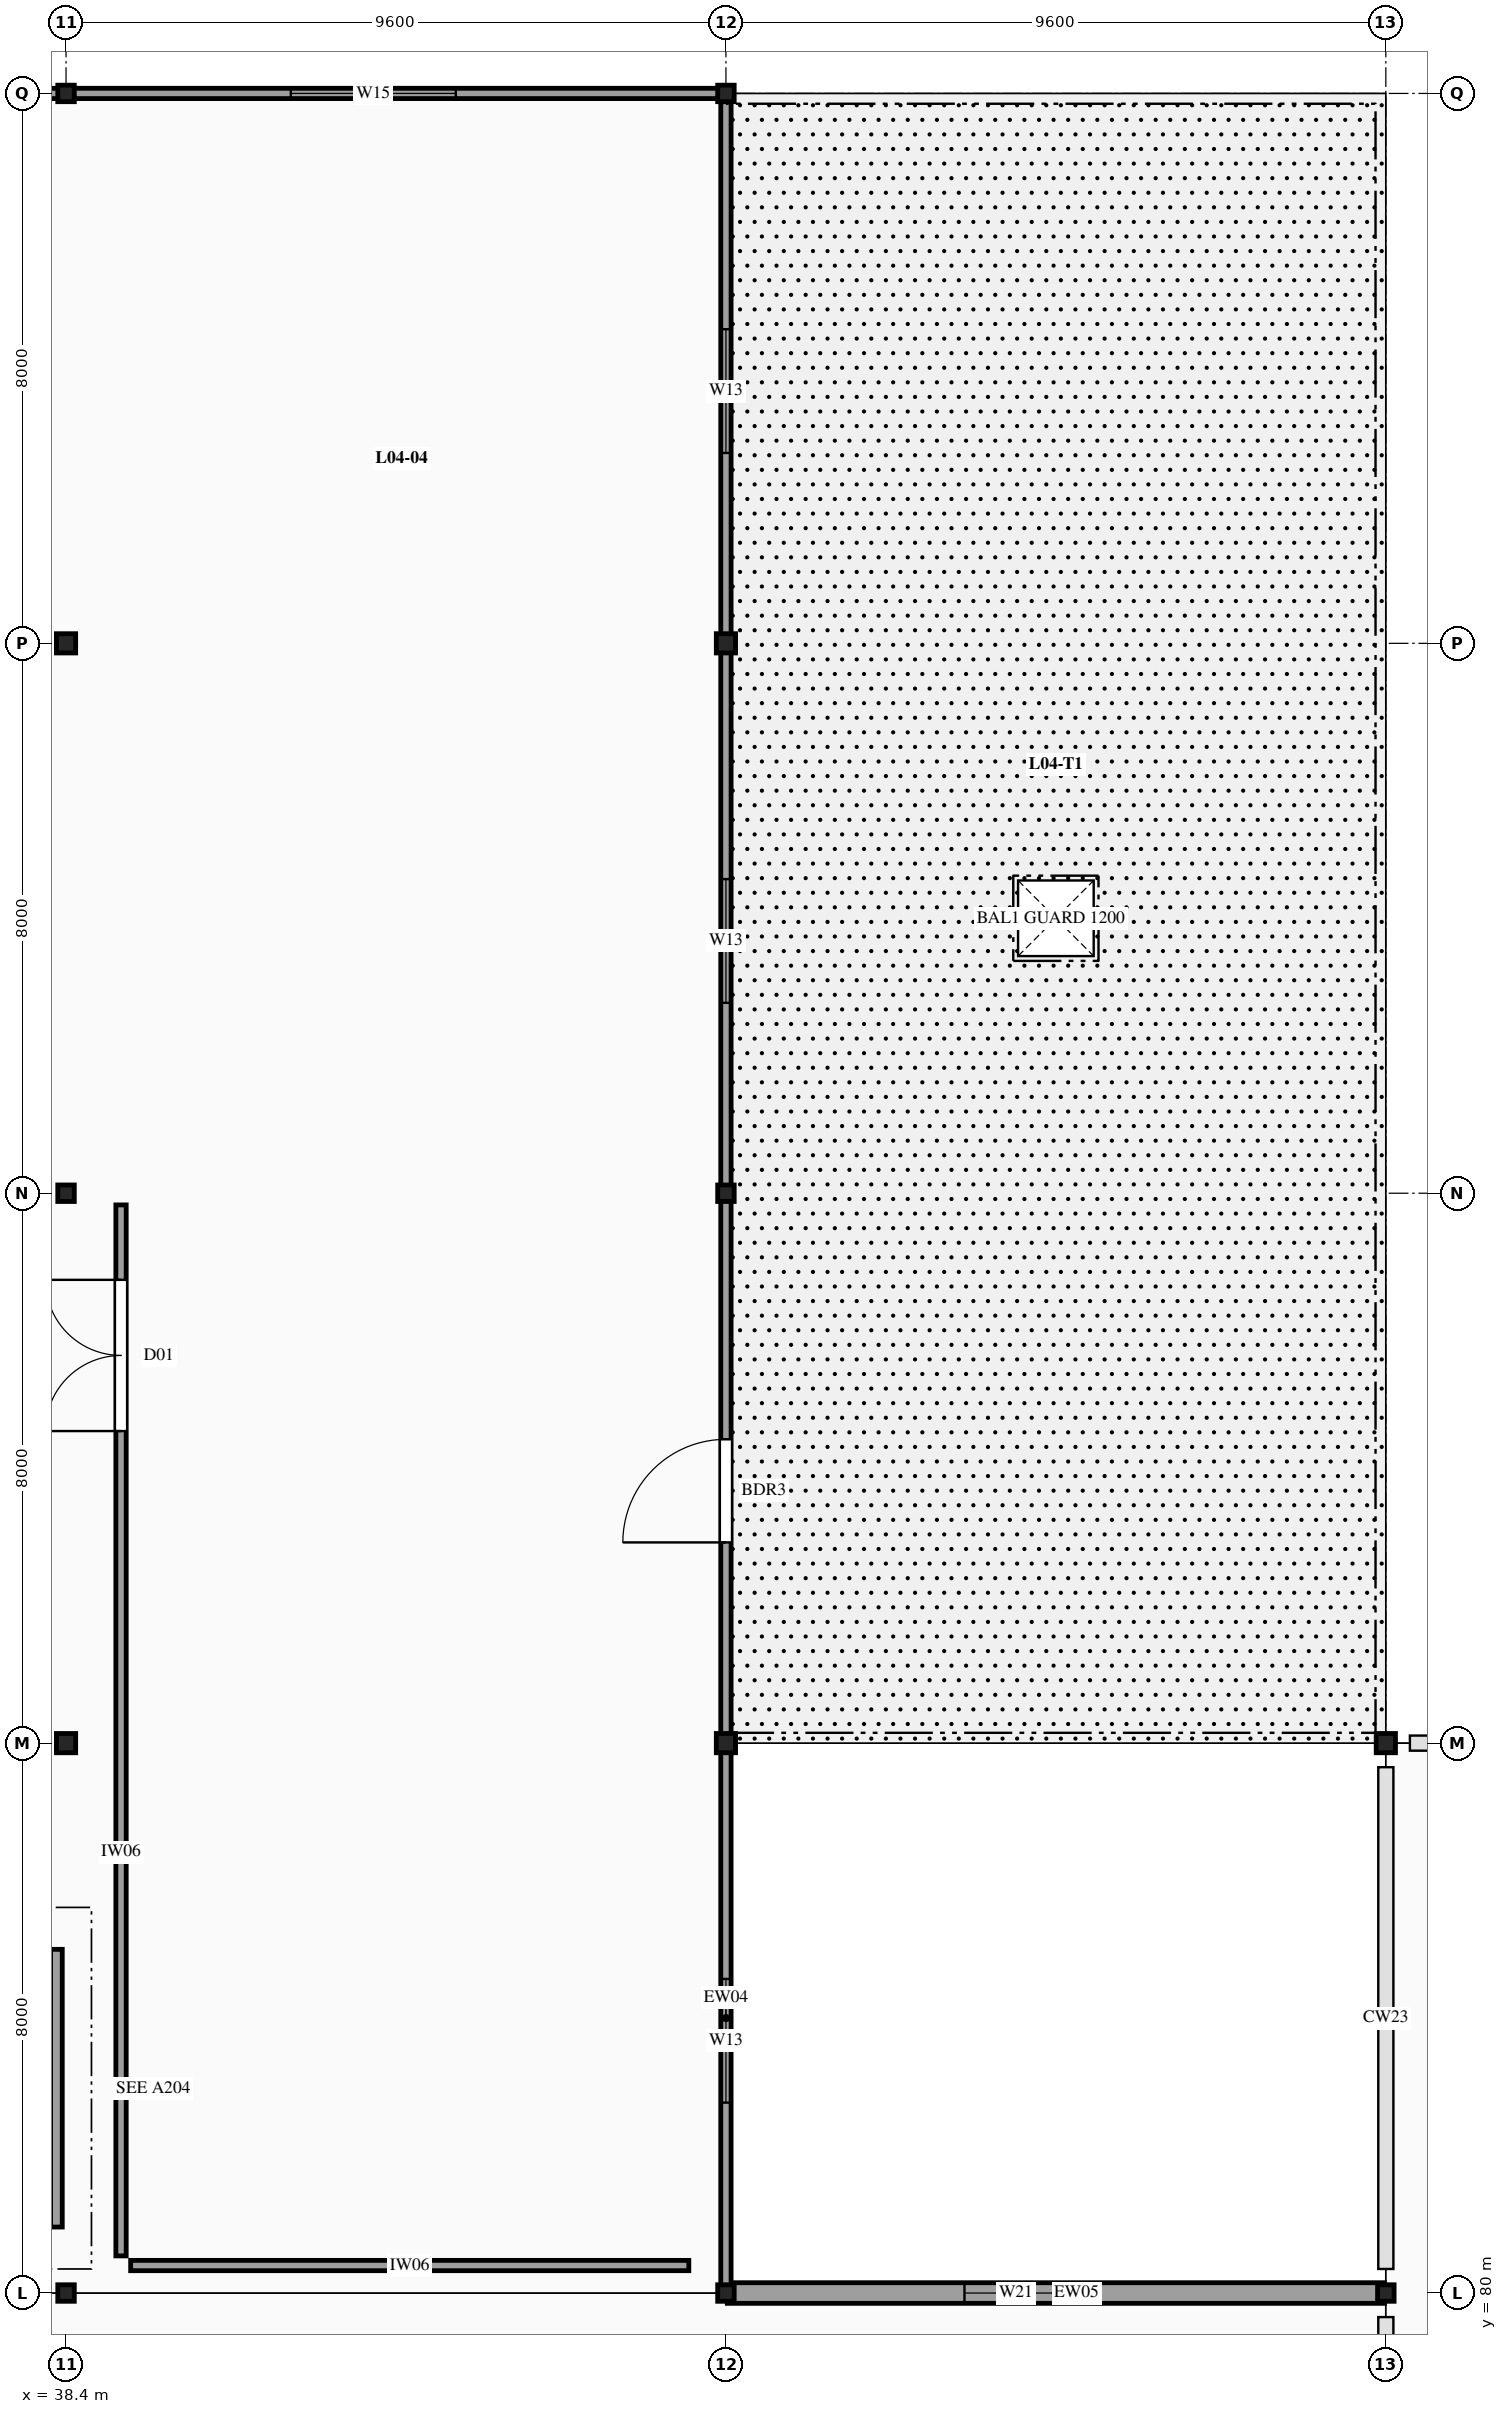
"""IFC4 building model, lengths in metres.
Left out: names, types, materials, properties, quantities, classifications, styles, units other than length and angle.
Written with IfcOpenShell. Run it as: python <this file> out.ifc"""

import sys

from ifc_helpers import new_model, si_unit, direction, frame, frame_2d, origin, origin_2d, place, context, subcontext, project, spatial, rectangle, i_section, extrude, element, fill, save


model = new_model("IFC4")
c1 = context("Model", 3, precision=1e-05, world=origin(), true_north=direction((0.0, 1.0)))
c2 = subcontext(c1, "Body", "Model", "MODEL_VIEW")
j1 = project(units=[si_unit("LENGTHUNIT", "METRE"), si_unit("PLANEANGLEUNIT", "RADIAN")], contexts=[c1])
p1 = place(None, origin())
s1 = spatial("IfcSite", under=j1, at=p1, CompositionType="ELEMENT")
p2 = place(p1, origin())
s2 = spatial("IfcBuilding", under=s1, at=p2, CompositionType="ELEMENT")
p3 = place(p2, frame((0.0, 0.0, 17.4)))
s3 = spatial("IfcBuildingStorey", under=s2, at=p3, CompositionType="ELEMENT", Elevation=17.4)
p4 = place(p3, frame((38.4, 80.0, -0.28), z_axis=(0.0, 0.0, 1.0), x_axis=(1.0, 0.0, 0.0)))
e1 = element("IfcColumn", 1, at=p4, inside=s3, PredefinedType="COLUMN", context=c2, shape_type="SweptSolid", body=[
    extrude(i_section(OverallWidth=0.24, OverallDepth=0.24, WebThickness=0.01, FlangeThickness=0.017, FilletRadius=0.021, at=origin_2d()), origin(), (0.0, 0.0, 1.0), 8.42),
])
p5 = place(p3, frame((38.4, 88.0, -0.28), z_axis=(0.0, 0.0, 1.0), x_axis=(1.0, 0.0, 0.0)))
e2 = element("IfcColumn", 2, at=p5, inside=s3, PredefinedType="COLUMN", context=c2, shape_type="SweptSolid", body=[
    extrude(i_section(OverallWidth=0.28, OverallDepth=0.28, WebThickness=0.01, FlangeThickness=0.018, FilletRadius=0.024, at=origin_2d()), origin(), (0.0, 0.0, 1.0), 8.42),
])
p6 = place(p3, frame((38.4, 96.0, -0.28), z_axis=(0.0, 0.0, 1.0), x_axis=(1.0, 0.0, 0.0)))
e3 = element("IfcColumn", 3, at=p6, inside=s3, PredefinedType="COLUMN", context=c2, shape_type="SweptSolid", body=[
    extrude(i_section(OverallWidth=0.24, OverallDepth=0.24, WebThickness=0.01, FlangeThickness=0.017, FilletRadius=0.021, at=origin_2d()), origin(), (0.0, 0.0, 1.0), 8.42),
])
p7 = place(p3, frame((38.4, 104.0, -0.28), z_axis=(0.0, 0.0, 1.0), x_axis=(1.0, 0.0, 0.0)))
e4 = element("IfcColumn", 4, at=p7, inside=s3, PredefinedType="COLUMN", context=c2, shape_type="SweptSolid", body=[
    extrude(i_section(OverallWidth=0.28, OverallDepth=0.28, WebThickness=0.01, FlangeThickness=0.018, FilletRadius=0.024, at=origin_2d()), origin(), (0.0, 0.0, 1.0), 8.42),
])
for number, where, z_axis, x_axis in (
    (5, (38.4, 112.0, -0.28), (0.0, 0.0, 1.0), (1.0, 0.0, 0.0)),
    (6, (48.0, 80.0, -0.28), (0.0, 0.0, 1.0), (1.0, 0.0, 0.0)),
):
    element("IfcColumn", number, at=place(p3, frame(where, z_axis=z_axis, x_axis=x_axis)), inside=s3, PredefinedType="COLUMN", context=c2, shape_type="SweptSolid", body=[
        extrude(i_section(OverallWidth=0.24, OverallDepth=0.24, WebThickness=0.01, FlangeThickness=0.017, FilletRadius=0.021, at=origin_2d()), origin(), (0.0, 0.0, 1.0), 8.42),
    ])
p8 = place(p3, frame((48.0, 88.0, -0.28), z_axis=(0.0, 0.0, 1.0), x_axis=(1.0, 0.0, 0.0)))
e7 = element("IfcColumn", 7, at=p8, inside=s3, PredefinedType="COLUMN", context=c2, shape_type="SweptSolid", body=[
    extrude(i_section(OverallWidth=0.28, OverallDepth=0.28, WebThickness=0.01, FlangeThickness=0.018, FilletRadius=0.024, at=origin_2d()), origin(), (0.0, 0.0, 1.0), 8.42),
])
p9 = place(p3, frame((48.0, 96.0, -0.28), z_axis=(0.0, 0.0, 1.0), x_axis=(1.0, 0.0, 0.0)))
e8 = element("IfcColumn", 8, at=p9, inside=s3, PredefinedType="COLUMN", context=c2, shape_type="SweptSolid", body=[
    extrude(i_section(OverallWidth=0.24, OverallDepth=0.24, WebThickness=0.01, FlangeThickness=0.017, FilletRadius=0.021, at=origin_2d()), origin(), (0.0, 0.0, 1.0), 8.42),
])
p10 = place(p3, frame((48.0, 104.0, -0.28), z_axis=(0.0, 0.0, 1.0), x_axis=(1.0, 0.0, 0.0)))
e9 = element("IfcColumn", 9, at=p10, inside=s3, PredefinedType="COLUMN", context=c2, shape_type="SweptSolid", body=[
    extrude(i_section(OverallWidth=0.28, OverallDepth=0.28, WebThickness=0.01, FlangeThickness=0.018, FilletRadius=0.024, at=origin_2d()), origin(), (0.0, 0.0, 1.0), 8.42),
])
p11 = place(p3, frame((48.0, 112.0, -0.28), z_axis=(0.0, 0.0, 1.0), x_axis=(1.0, 0.0, 0.0)))
e10 = element("IfcColumn", 10, at=p11, inside=s3, PredefinedType="COLUMN", context=c2, shape_type="SweptSolid", body=[
    extrude(i_section(OverallWidth=0.24, OverallDepth=0.24, WebThickness=0.01, FlangeThickness=0.017, FilletRadius=0.021, at=origin_2d()), origin(), (0.0, 0.0, 1.0), 8.42),
])
p12 = place(p3, frame((57.6, 80.0, -0.28), z_axis=(0.0, 0.0, 1.0), x_axis=(1.0, 0.0, 0.0)))
e11 = element("IfcColumn", 11, at=p12, inside=s3, PredefinedType="COLUMN", context=c2, shape_type="SweptSolid", body=[
    extrude(i_section(OverallWidth=0.24, OverallDepth=0.24, WebThickness=0.01, FlangeThickness=0.017, FilletRadius=0.021, at=origin_2d()), origin(), (0.0, 0.0, 1.0), 8.43),
])
p13 = place(p3, frame((57.6, 88.0, -0.28), z_axis=(0.0, 0.0, 1.0), x_axis=(1.0, 0.0, 0.0)))
e12 = element("IfcColumn", 12, at=p13, inside=s3, PredefinedType="COLUMN", context=c2, shape_type="SweptSolid", body=[
    extrude(i_section(OverallWidth=0.28, OverallDepth=0.28, WebThickness=0.01, FlangeThickness=0.018, FilletRadius=0.024, at=origin_2d()), origin(), (0.0, 0.0, 1.0), 8.43),
])
p14 = place(p3, frame((48.02, 80.0, 0.0), z_axis=(0.0, 0.0, 1.0), x_axis=(1.0, 0.0, 0.0)))
e13 = element("IfcWall", 13, at=p14, inside=s3, PredefinedType="SOLIDWALL", context=c2, shape_type="SweptSolid", body=[
    extrude(rectangle(XDim=9.56, YDim=0.3, at=frame_2d((4.78, 0.0))), origin(), (0.0, 0.0, 1.0), 7.25),
])
p15 = place(p14, frame((3.45, 0.0, 0.85)))
e14 = element("IfcOpeningElement", 14, at=p15, cuts=e13, PredefinedType="OPENING", context=c2, shape_type="SweptSolid", body=[
    extrude(rectangle(XDim=1.5, YDim=3.2, at=frame_2d((0.75, 1.6))), frame((0.0, 0.16, 0.0), z_axis=(0.0, -1.0, 0.0), x_axis=(1.0, 0.0, 0.0)), (0.0, 0.0, 1.0), 0.32),
])
p16 = place(p3, frame((28.82, 112.0, 0.0), z_axis=(0.0, 0.0, 1.0), x_axis=(1.0, 0.0, 0.0)))
e15 = element("IfcWall", 15, at=p16, inside=s3, PredefinedType="SOLIDWALL", context=c2, shape_type="SweptSolid", body=[
    extrude(rectangle(XDim=9.56, YDim=0.15, at=frame_2d((4.78, 0.0))), origin(), (0.0, 0.0, 1.0), 7.6),
])
p17 = place(p16, frame((3.25, 0.0, 0.95)))
e16 = element("IfcOpeningElement", 16, at=p17, cuts=e15, PredefinedType="OPENING", context=c2, shape_type="SweptSolid", body=[
    extrude(rectangle(XDim=2.4, YDim=2.2, at=frame_2d((1.2, 1.1))), frame((0.0, 0.085, 0.0), z_axis=(0.0, -1.0, 0.0), x_axis=(1.0, 0.0, 0.0)), (0.0, 0.0, 1.0), 0.17),
])
p18 = place(p3, frame((38.42, 112.0, 0.0), z_axis=(0.0, 0.0, 1.0), x_axis=(1.0, 0.0, 0.0)))
e17 = element("IfcWall", 17, at=p18, inside=s3, PredefinedType="SOLIDWALL", context=c2, shape_type="SweptSolid", body=[
    extrude(rectangle(XDim=9.56, YDim=0.15, at=frame_2d((4.78, 0.0))), origin(), (0.0, 0.0, 1.0), 7.6),
])
p19 = place(p18, frame((3.25, 0.0, 0.95)))
e18 = element("IfcOpeningElement", 18, at=p19, cuts=e17, PredefinedType="OPENING", context=c2, shape_type="SweptSolid", body=[
    extrude(rectangle(XDim=2.4, YDim=2.2, at=frame_2d((1.2, 1.1))), frame((0.0, 0.085, 0.0), z_axis=(0.0, -1.0, 0.0), x_axis=(1.0, 0.0, 0.0)), (0.0, 0.0, 1.0), 0.17),
])
p20 = place(p3, frame((48.0, 80.02, 0.0), z_axis=(0.0, 0.0, 1.0), x_axis=(0.0, 1.0, 0.0)))
e19 = element("IfcWall", 19, at=p20, inside=s3, PredefinedType="SOLIDWALL", context=c2, shape_type="SweptSolid", body=[
    extrude(rectangle(XDim=7.96, YDim=0.15, at=frame_2d((3.98, 0.0))), origin(), (0.0, 0.0, 1.0), 7.6),
])
p21 = place(p20, frame((2.75, 0.0, 1.05)))
e20 = element("IfcOpeningElement", 20, at=p21, cuts=e19, PredefinedType="OPENING", context=c2, shape_type="SweptSolid", body=[
    extrude(rectangle(XDim=1.8, YDim=1.6, at=frame_2d((0.9, 0.8))), frame((0.0, 0.085, 0.0), z_axis=(0.0, -1.0, 0.0), x_axis=(1.0, 0.0, 0.0)), (0.0, 0.0, 1.0), 0.17),
])
p22 = place(p3, frame((48.0, 88.02, 0.0), z_axis=(0.0, 0.0, 1.0), x_axis=(0.0, 1.0, 0.0)))
e21 = element("IfcWall", 21, at=p22, inside=s3, PredefinedType="SOLIDWALL", context=c2, shape_type="SweptSolid", body=[
    extrude(rectangle(XDim=7.96, YDim=0.15, at=frame_2d((3.98, 0.0))), origin(), (0.0, 0.0, 1.0), 7.6),
])
p23 = place(p22, frame((2.9, 0.0, 0.0)))
e22 = element("IfcOpeningElement", 22, at=p23, cuts=e21, PredefinedType="OPENING", context=c2, shape_type="SweptSolid", body=[
    extrude(rectangle(XDim=1.5, YDim=2.2, at=frame_2d((0.75, 1.1))), frame((0.0, 0.085, 0.0), z_axis=(0.0, -1.0, 0.0), x_axis=(1.0, 0.0, 0.0)), (0.0, 0.0, 1.0), 0.17),
])
p24 = place(p3, frame((48.0, 96.02, 0.0), z_axis=(0.0, 0.0, 1.0), x_axis=(0.0, 1.0, 0.0)))
e23 = element("IfcWall", 23, at=p24, inside=s3, PredefinedType="SOLIDWALL", context=c2, shape_type="SweptSolid", body=[
    extrude(rectangle(XDim=7.96, YDim=0.15, at=frame_2d((3.98, 0.0))), origin(), (0.0, 0.0, 1.0), 7.6),
])
p25 = place(p24, frame((2.75, 0.0, 1.05)))
e24 = element("IfcOpeningElement", 24, at=p25, cuts=e23, PredefinedType="OPENING", context=c2, shape_type="SweptSolid", body=[
    extrude(rectangle(XDim=1.8, YDim=1.6, at=frame_2d((0.9, 0.8))), frame((0.0, 0.085, 0.0), z_axis=(0.0, -1.0, 0.0), x_axis=(1.0, 0.0, 0.0)), (0.0, 0.0, 1.0), 0.17),
])
p26 = place(p3, frame((48.0, 104.02, 0.0), z_axis=(0.0, 0.0, 1.0), x_axis=(0.0, 1.0, 0.0)))
e25 = element("IfcWall", 25, at=p26, inside=s3, PredefinedType="SOLIDWALL", context=c2, shape_type="SweptSolid", body=[
    extrude(rectangle(XDim=7.96, YDim=0.15, at=frame_2d((3.98, 0.0))), origin(), (0.0, 0.0, 1.0), 7.6),
])
p27 = place(p26, frame((2.75, 0.0, 1.05)))
e26 = element("IfcOpeningElement", 26, at=p27, cuts=e25, PredefinedType="OPENING", context=c2, shape_type="SweptSolid", body=[
    extrude(rectangle(XDim=1.8, YDim=1.6, at=frame_2d((0.9, 0.8))), frame((0.0, 0.085, 0.0), z_axis=(0.0, -1.0, 0.0), x_axis=(1.0, 0.0, 0.0)), (0.0, 0.0, 1.0), 0.17),
])
p28 = place(p3, frame((38.26, 80.96, 0.0), z_axis=(0.0, 0.0, 1.0), x_axis=(0.0, 1.0, 0.0)))
e27 = element("IfcWall", 27, at=p28, inside=s3, PredefinedType="SOLIDWALL", context=c2, shape_type="SweptSolid", body=[
    extrude(rectangle(XDim=4.04, YDim=0.17, at=frame_2d((2.02, 0.0))), origin(), (0.0, 0.0, 1.0), 7.5),
])
p29 = place(p3, frame((39.34, 80.4, 0.0), z_axis=(0.0, 0.0, 1.0), x_axis=(1.0, 0.0, 0.0)))
e28 = element("IfcWall", 28, at=p29, inside=s3, PredefinedType="PARTITIONING", context=c2, shape_type="SweptSolid", body=[
    extrude(rectangle(XDim=8.12, YDim=0.15, at=frame_2d((4.06, 0.0))), origin(), (0.0, 0.0, 1.0), 7.5),
])
p30 = place(p3, frame((39.2, 80.54, 0.0), z_axis=(0.0, 0.0, 1.0), x_axis=(0.0, 1.0, 0.0)))
e29 = element("IfcWall", 29, at=p30, inside=s3, PredefinedType="PARTITIONING", context=c2, shape_type="SweptSolid", body=[
    extrude(rectangle(XDim=15.29, YDim=0.15, at=frame_2d((7.645, 0.0))), origin(), (0.0, 0.0, 1.0), 7.5),
])
p31 = place(p30, frame((12.0, 0.0, 0.0)))
e30 = element("IfcOpeningElement", 30, at=p31, cuts=e29, PredefinedType="OPENING", context=c2, shape_type="SweptSolid", body=[
    extrude(rectangle(XDim=2.2, YDim=2.7, at=frame_2d((1.1, 1.35))), frame((0.0, 0.085, 0.0), z_axis=(0.0, -1.0, 0.0), x_axis=(1.0, 0.0, 0.0)), (0.0, 0.0, 1.0), 0.17),
])
p32 = place(p15, origin())
e31 = element("IfcWindow", 31, at=p32, inside=s3, PartitioningType="SINGLE_PANEL", PredefinedType="WINDOW", context=c2, shape_type="SweptSolid", body=[
    extrude(rectangle(XDim=1.5, YDim=3.2, at=frame_2d((0.75, 1.6))), frame((0.0, 0.03, 0.0), z_axis=(0.0, -1.0, 0.0), x_axis=(1.0, 0.0, 0.0)), (0.0, 0.0, 1.0), 0.06),
])
fill(e14, e31)
p33 = place(p19, origin())
e32 = element("IfcWindow", 32, at=p33, inside=s3, PartitioningType="SINGLE_PANEL", PredefinedType="WINDOW", context=c2, shape_type="SweptSolid", body=[
    extrude(rectangle(XDim=2.4, YDim=2.2, at=frame_2d((1.2, 1.1))), frame((0.0, 0.03, 0.0), z_axis=(0.0, -1.0, 0.0), x_axis=(1.0, 0.0, 0.0)), (0.0, 0.0, 1.0), 0.06),
])
fill(e18, e32)
p34 = place(p21, origin())
e33 = element("IfcWindow", 33, at=p34, inside=s3, PartitioningType="SINGLE_PANEL", PredefinedType="WINDOW", context=c2, shape_type="SweptSolid", body=[
    extrude(rectangle(XDim=1.8, YDim=1.6, at=frame_2d((0.9, 0.8))), frame((0.0, 0.03, 0.0), z_axis=(0.0, -1.0, 0.0), x_axis=(1.0, 0.0, 0.0)), (0.0, 0.0, 1.0), 0.06),
])
fill(e20, e33)
p35 = place(p23, origin())
e34 = element("IfcDoor", 34, at=p35, inside=s3, OperationType="SINGLE_SWING_LEFT", PredefinedType="DOOR", context=c2, shape_type="SweptSolid", body=[
    extrude(rectangle(XDim=1.5, YDim=2.2, at=frame_2d((0.75, 1.1))), frame((0.0, 0.025, 0.0), z_axis=(0.0, -1.0, 0.0), x_axis=(1.0, 0.0, 0.0)), (0.0, 0.0, 1.0), 0.05),
])
fill(e22, e34)
p36 = place(p25, origin())
e35 = element("IfcWindow", 35, at=p36, inside=s3, PartitioningType="SINGLE_PANEL", PredefinedType="WINDOW", context=c2, shape_type="SweptSolid", body=[
    extrude(rectangle(XDim=1.8, YDim=1.6, at=frame_2d((0.9, 0.8))), frame((0.0, 0.03, 0.0), z_axis=(0.0, -1.0, 0.0), x_axis=(1.0, 0.0, 0.0)), (0.0, 0.0, 1.0), 0.06),
])
fill(e24, e35)
p37 = place(p27, origin())
e36 = element("IfcWindow", 36, at=p37, inside=s3, PartitioningType="SINGLE_PANEL", PredefinedType="WINDOW", context=c2, shape_type="SweptSolid", body=[
    extrude(rectangle(XDim=1.8, YDim=1.6, at=frame_2d((0.9, 0.8))), frame((0.0, 0.03, 0.0), z_axis=(0.0, -1.0, 0.0), x_axis=(1.0, 0.0, 0.0)), (0.0, 0.0, 1.0), 0.06),
])
fill(e26, e36)
p38 = place(p31, origin())
e37 = element("IfcDoor", 37, at=p38, inside=s3, OperationType="DOUBLE_DOOR_SINGLE_SWING", PredefinedType="DOOR", context=c2, shape_type="SweptSolid", body=[
    extrude(rectangle(XDim=2.2, YDim=2.7, at=frame_2d((1.1, 1.35))), frame((0.0, 0.025, 0.0), z_axis=(0.0, -1.0, 0.0), x_axis=(1.0, 0.0, 0.0)), (0.0, 0.0, 1.0), 0.05),
])
fill(e30, e37)
save(model, sys.argv[1])
